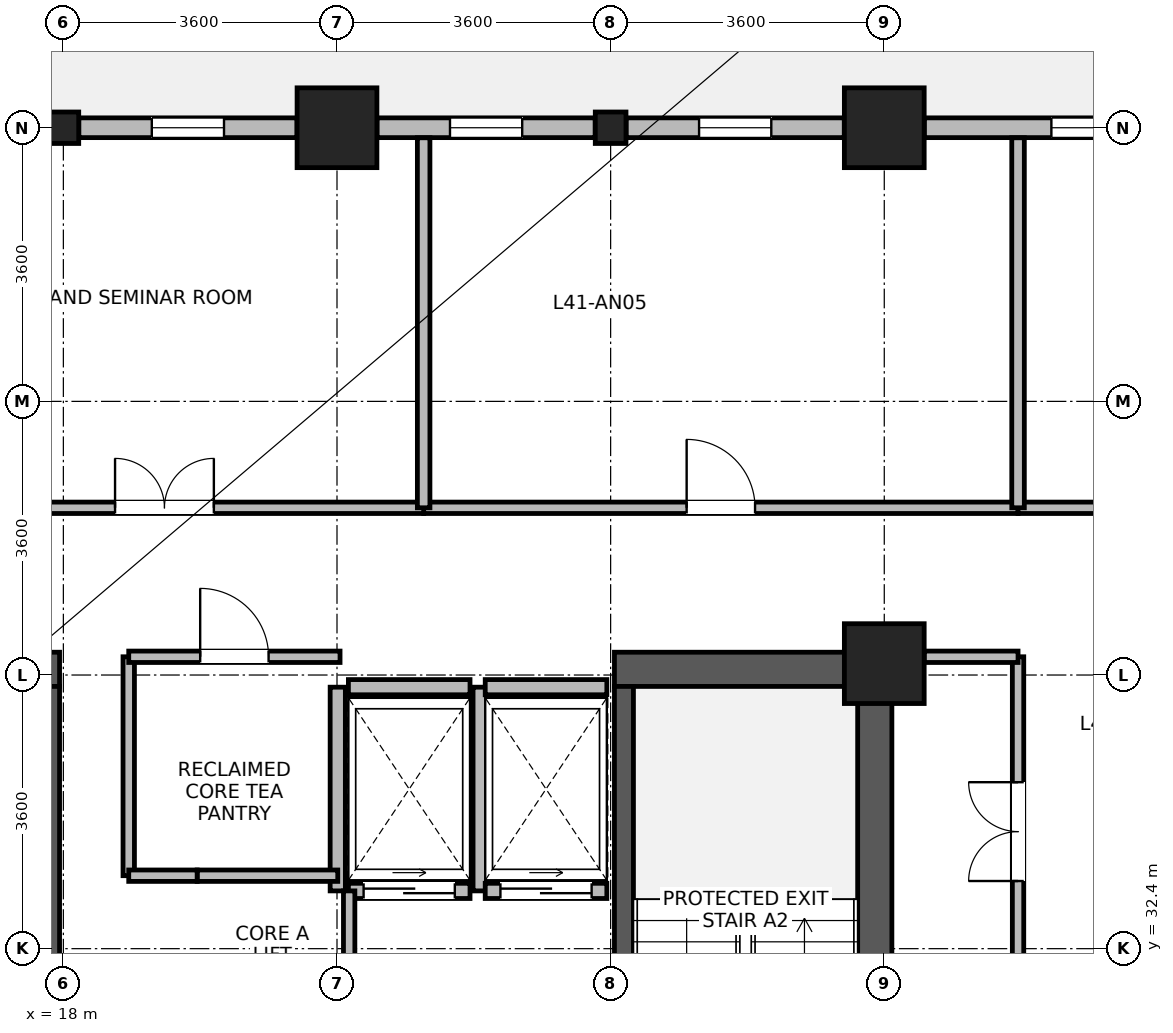
"""IFC4 building model, lengths in metres.
Left out: names, types, materials, properties, quantities, classifications, styles, units other than length and angle.
Written with IfcOpenShell. Run it as: python <this file> out.ifc"""

import sys

from ifc_helpers import new_model, si_unit, direction, frame, frame_2d, origin, origin_2d, place, context, subcontext, project, spatial, rectangle, i_section, extrude, source, transform, mapped, element, fill, save


model = new_model("IFC4")
c1 = context("Model", 3, precision=1e-05, world=origin(), true_north=direction((0.0, 1.0)))
c2 = subcontext(c1, "Body", "Model", "MODEL_VIEW")
j1 = project(units=[si_unit("LENGTHUNIT", "METRE"), si_unit("PLANEANGLEUNIT", "RADIAN")], contexts=[c1])
p1 = place(None, origin())
s1 = spatial("IfcSite", under=j1, at=p1, CompositionType="ELEMENT")
p2 = place(p1, origin())
s2 = spatial("IfcBuilding", under=s1, at=p2, CompositionType="ELEMENT")
p3 = place(p2, frame((0.0, 0.0, 162.4)))
s3 = spatial("IfcBuildingStorey", under=s2, at=p3, CompositionType="ELEMENT", Elevation=162.4)
p4 = place(p3, frame((28.675, 28.4, 0.0), z_axis=(0.0, 0.0, 1.0), x_axis=(0.0, 1.0, 0.0)))
e1 = element("IfcWall", 1, at=p4, inside=s3, PredefinedType="SHEAR", context=c2, shape_type="SweptSolid", body=[
    extrude(rectangle(XDim=7.9, YDim=0.45, at=frame_2d((3.95, 0.0))), origin(), (0.0, 0.0, 1.0), 3.46),
])
for number, where, z_axis, x_axis in (
    (2, (14.75, 36.075, 0.0), (0.0, 0.0, 1.0), (1.0, 0.0, 0.0)),
    (3, (25.25, 36.075, 0.0), (0.0, 0.0, 1.0), (1.0, 0.0, 0.0)),
):
    element("IfcWall", number, at=place(p3, frame(where, z_axis=z_axis, x_axis=x_axis)), inside=s3, PredefinedType="SHEAR", context=c2, shape_type="SweptSolid", body=[
        extrude(rectangle(XDim=3.2, YDim=0.45, at=frame_2d((1.6, 0.0))), origin(), (0.0, 0.0, 1.0), 3.46),
    ])
p5 = place(p3, frame((17.825, 28.85, 0.0), z_axis=(0.0, 0.0, 1.0), x_axis=(0.0, 1.0, 0.0)))
e4 = element("IfcWall", 4, at=p5, inside=s3, PredefinedType="SHEAR", context=c2, shape_type="SweptSolid", body=[
    extrude(rectangle(XDim=7.0, YDim=0.25, at=frame_2d((3.5, 0.0))), origin(), (0.0, 0.0, 1.0), 3.46),
])
p6 = place(p5, frame((0.15, 0.0, 0.0)))
e5 = element("IfcOpeningElement", 5, at=p6, cuts=e4, PredefinedType="OPENING", context=c2, shape_type="SweptSolid", body=[
    extrude(rectangle(XDim=1.1, YDim=2.08, at=frame_2d((0.55, 1.04))), frame((0.0, 0.135, 0.0), z_axis=(0.0, -1.0, 0.0), x_axis=(1.0, 0.0, 0.0)), (0.0, 0.0, 1.0), 0.27),
])
p7 = place(p3, frame((25.375, 28.85, 0.0), z_axis=(0.0, 0.0, 1.0), x_axis=(0.0, 1.0, 0.0)))
e6 = element("IfcWall", 6, at=p7, inside=s3, PredefinedType="SHEAR", context=c2, shape_type="SweptSolid", body=[
    extrude(rectangle(XDim=7.0, YDim=0.25, at=frame_2d((3.5, 0.0))), origin(), (0.0, 0.0, 1.0), 3.46),
])
p8 = place(p7, frame((0.15, 0.0, 0.0)))
e7 = element("IfcOpeningElement", 7, at=p8, cuts=e6, PredefinedType="OPENING", context=c2, shape_type="SweptSolid", body=[
    extrude(rectangle(XDim=1.1, YDim=2.08, at=frame_2d((0.55, 1.04))), frame((0.0, 0.135, 0.0), z_axis=(0.0, -1.0, 0.0), x_axis=(1.0, 0.0, 0.0)), (0.0, 0.0, 1.0), 0.27),
])
m1 = source(origin(), c2, "Body", "SweptSolid", [
    extrude(rectangle(XDim=1.05, YDim=1.05, at=origin_2d()), origin(), (0.0, 0.0, 1.0), 3.7),
])
for number, where, z_axis, x_axis in (
    (8, (21.6, 43.2, 0.0), (0.0, 0.0, 1.0), (1.0, 0.0, 0.0)),
    (9, (28.8, 36.15, 0.0), (0.0, 0.0, 1.0), (1.0, 0.0, 0.0)),
    (10, (28.8, 43.2, 0.0), (0.0, 0.0, 1.0), (1.0, 0.0, 0.0)),
):
    element("IfcColumn", number, at=place(p3, frame(where, z_axis=z_axis, x_axis=x_axis)), inside=s3, PredefinedType="COLUMN", context=c2, shape_type="MappedRepresentation", body=[
        mapped(m1, transform((0.0, 0.0, 0.0), x_axis=(1.0, 0.0, 0.0), y_axis=(0.0, 1.0, 0.0), z_axis=(0.0, 0.0, 1.0), scale=1.0)),
    ])
m2 = source(origin(), c2, "Body", "SweptSolid", [
    extrude(i_section(OverallWidth=0.404, OverallDepth=0.414, WebThickness=0.021, FlangeThickness=0.028, FilletRadius=0.015, at=origin_2d()), origin(), (0.0, 0.0, 1.0), 3.7),
])
for number, where, z_axis, x_axis in (
    (11, (18.0, 43.2, 0.0), (0.0, 0.0, 1.0), (1.0, 0.0, 0.0)),
    (12, (25.2, 43.2, 0.0), (0.0, 0.0, 1.0), (1.0, 0.0, 0.0)),
):
    element("IfcColumn", number, at=place(p3, frame(where, z_axis=z_axis, x_axis=x_axis)), inside=s3, PredefinedType="COLUMN", context=c2, shape_type="MappedRepresentation", body=[
        mapped(m2, transform((0.0, 0.0, 0.0), x_axis=(1.0, 0.0, 0.0), y_axis=(0.0, 1.0, 0.0), z_axis=(0.0, 0.0, 1.0), scale=1.0)),
    ])
p9 = place(p3, frame((29.326, 43.2, 0.0), z_axis=(0.0, 0.0, 1.0), x_axis=(1.0, 0.0, 0.0)))
e13 = element("IfcWall", 13, at=p9, inside=s3, PredefinedType="STANDARD", context=c2, shape_type="SweptSolid", body=[
    extrude(rectangle(XDim=2.871, YDim=0.26, at=frame_2d((1.436, 0.0))), origin(), (0.0, 0.0, 1.0), 2.99),
])
p10 = place(p9, frame((1.673, 0.0, 0.85)))
e14 = element("IfcOpeningElement", 14, at=p10, cuts=e13, PredefinedType="OPENING", context=c2, shape_type="SweptSolid", body=[
    extrude(rectangle(XDim=0.95, YDim=1.75, at=frame_2d((0.475, 0.875))), frame((0.0, 0.14, 0.0), z_axis=(0.0, -1.0, 0.0), x_axis=(1.0, 0.0, 0.0)), (0.0, 0.0, 1.0), 0.28),
])
p11 = place(p3, frame((25.403, 43.2, 0.0), z_axis=(0.0, 0.0, 1.0), x_axis=(1.0, 0.0, 0.0)))
e15 = element("IfcWall", 15, at=p11, inside=s3, PredefinedType="STANDARD", context=c2, shape_type="SweptSolid", body=[
    extrude(rectangle(XDim=2.871, YDim=0.26, at=frame_2d((1.436, 0.0))), origin(), (0.0, 0.0, 1.0), 2.99),
])
p12 = place(p11, frame((0.96, 0.0, 0.85)))
e16 = element("IfcOpeningElement", 16, at=p12, cuts=e15, PredefinedType="OPENING", context=c2, shape_type="SweptSolid", body=[
    extrude(rectangle(XDim=0.95, YDim=1.75, at=frame_2d((0.475, 0.875))), frame((0.0, 0.14, 0.0), z_axis=(0.0, -1.0, 0.0), x_axis=(1.0, 0.0, 0.0)), (0.0, 0.0, 1.0), 0.28),
])
p13 = place(p3, frame((22.126, 43.2, 0.0), z_axis=(0.0, 0.0, 1.0), x_axis=(1.0, 0.0, 0.0)))
e17 = element("IfcWall", 17, at=p13, inside=s3, PredefinedType="STANDARD", context=c2, shape_type="SweptSolid", body=[
    extrude(rectangle(XDim=2.871, YDim=0.26, at=frame_2d((1.436, 0.0))), origin(), (0.0, 0.0, 1.0), 2.99),
])
p14 = place(p13, frame((0.96, 0.0, 0.85)))
e18 = element("IfcOpeningElement", 18, at=p14, cuts=e17, PredefinedType="OPENING", context=c2, shape_type="SweptSolid", body=[
    extrude(rectangle(XDim=0.95, YDim=1.75, at=frame_2d((0.475, 0.875))), frame((0.0, 0.14, 0.0), z_axis=(0.0, -1.0, 0.0), x_axis=(1.0, 0.0, 0.0)), (0.0, 0.0, 1.0), 0.28),
])
p15 = place(p3, frame((18.203, 43.2, 0.0), z_axis=(0.0, 0.0, 1.0), x_axis=(1.0, 0.0, 0.0)))
e19 = element("IfcWall", 19, at=p15, inside=s3, PredefinedType="STANDARD", context=c2, shape_type="SweptSolid", body=[
    extrude(rectangle(XDim=2.871, YDim=0.26, at=frame_2d((1.436, 0.0))), origin(), (0.0, 0.0, 1.0), 2.99),
])
p16 = place(p15, frame((0.96, 0.0, 0.85)))
e20 = element("IfcOpeningElement", 20, at=p16, cuts=e19, PredefinedType="OPENING", context=c2, shape_type="SweptSolid", body=[
    extrude(rectangle(XDim=0.95, YDim=1.75, at=frame_2d((0.475, 0.875))), frame((0.0, 0.14, 0.0), z_axis=(0.0, -1.0, 0.0), x_axis=(1.0, 0.0, 0.0)), (0.0, 0.0, 1.0), 0.28),
])
p17 = place(p3, frame((21.75, 33.16, 0.0), z_axis=(0.0, 0.0, 1.0), x_axis=(1.0, 0.0, 0.0)))
e21 = element("IfcWall", 21, at=p17, inside=s3, PredefinedType="PARTITIONING", context=c2, shape_type="SweptSolid", body=[
    extrude(rectangle(XDim=1.6, YDim=0.2, at=frame_2d((0.8, 0.0))), origin(), (0.0, 0.0, 1.0), 3.44),
])
p18 = place(p17, frame((0.2, 0.0, 0.0)))
e22 = element("IfcOpeningElement", 22, at=p18, cuts=e21, PredefinedType="OPENING", context=c2, shape_type="SweptSolid", body=[
    extrude(rectangle(XDim=1.2, YDim=2.12, at=frame_2d((0.6, 1.06))), frame((0.0, 0.11, 0.0), z_axis=(0.0, -1.0, 0.0), x_axis=(1.0, 0.0, 0.0)), (0.0, 0.0, 1.0), 0.22),
])
p19 = place(p3, frame((21.75, 35.84, 0.0), z_axis=(0.0, 0.0, 1.0), x_axis=(1.0, 0.0, 0.0)))
e23 = element("IfcWall", 23, at=p19, inside=s3, PredefinedType="PARTITIONING", context=c2, shape_type="SweptSolid", body=[
    extrude(rectangle(XDim=1.6, YDim=0.2, at=frame_2d((0.8, 0.0))), origin(), (0.0, 0.0, 1.0), 2.44),
])
for number, where, z_axis, x_axis in (
    (24, (21.61, 33.16, 0.0), (0.0, 0.0, 1.0), (0.0, 1.0, 0.0)),
    (25, (23.49, 33.16, 0.0), (0.0, 0.0, 1.0), (0.0, 1.0, 0.0)),
):
    element("IfcWall", number, at=place(p3, frame(where, z_axis=z_axis, x_axis=x_axis)), inside=s3, PredefinedType="PARTITIONING", context=c2, shape_type="SweptSolid", body=[
        extrude(rectangle(XDim=2.68, YDim=0.2, at=frame_2d((1.34, 0.0))), origin(), (0.0, 0.0, 1.0), 3.44),
    ])
p20 = place(p3, frame((23.55, 33.16, 0.0), z_axis=(0.0, 0.0, 1.0), x_axis=(1.0, 0.0, 0.0)))
e26 = element("IfcWall", 26, at=p20, inside=s3, PredefinedType="PARTITIONING", context=c2, shape_type="SweptSolid", body=[
    extrude(rectangle(XDim=1.6, YDim=0.2, at=frame_2d((0.8, 0.0))), origin(), (0.0, 0.0, 1.0), 3.44),
])
p21 = place(p20, frame((0.2, 0.0, 0.0)))
e27 = element("IfcOpeningElement", 27, at=p21, cuts=e26, PredefinedType="OPENING", context=c2, shape_type="SweptSolid", body=[
    extrude(rectangle(XDim=1.2, YDim=2.12, at=frame_2d((0.6, 1.06))), frame((0.0, 0.11, 0.0), z_axis=(0.0, -1.0, 0.0), x_axis=(1.0, 0.0, 0.0)), (0.0, 0.0, 1.0), 0.22),
])
p22 = place(p3, frame((23.55, 35.84, 0.0), z_axis=(0.0, 0.0, 1.0), x_axis=(1.0, 0.0, 0.0)))
e28 = element("IfcWall", 28, at=p22, inside=s3, PredefinedType="PARTITIONING", context=c2, shape_type="SweptSolid", body=[
    extrude(rectangle(XDim=1.6, YDim=0.2, at=frame_2d((0.8, 0.0))), origin(), (0.0, 0.0, 1.0), 2.44),
])
p23 = place(p3, frame((22.74, 38.2, 0.0), z_axis=(0.0, 0.0, 1.0), x_axis=(1.0, 0.0, 0.0)))
e29 = element("IfcWall", 29, at=p23, inside=s3, PredefinedType="PARTITIONING", context=c2, shape_type="SweptSolid", body=[
    extrude(rectangle(XDim=7.82, YDim=0.15, at=frame_2d((3.91, 0.0))), origin(), (0.0, 0.0, 1.0), 3.44),
])
p24 = place(p23, frame((3.46, 0.0, 0.0)))
e30 = element("IfcOpeningElement", 30, at=p24, cuts=e29, PredefinedType="OPENING", context=c2, shape_type="SweptSolid", body=[
    extrude(rectangle(XDim=0.9, YDim=2.08, at=frame_2d((0.45, 1.04))), frame((0.0, 0.085, 0.0), z_axis=(0.0, -1.0, 0.0), x_axis=(1.0, 0.0, 0.0)), (0.0, 0.0, 1.0), 0.17),
])
p25 = place(p3, frame((15.92, 38.2, 0.0), z_axis=(0.0, 0.0, 1.0), x_axis=(1.0, 0.0, 0.0)))
e31 = element("IfcWall", 31, at=p25, inside=s3, PredefinedType="PARTITIONING", context=c2, shape_type="SweptSolid", body=[
    extrude(rectangle(XDim=6.82, YDim=0.15, at=frame_2d((3.41, 0.0))), origin(), (0.0, 0.0, 1.0), 3.44),
])
p26 = place(p25, frame((2.76, 0.0, 0.0)))
e32 = element("IfcOpeningElement", 32, at=p26, cuts=e31, PredefinedType="OPENING", context=c2, shape_type="SweptSolid", body=[
    extrude(rectangle(XDim=1.3, YDim=2.12, at=frame_2d((0.65, 1.06))), frame((0.0, 0.085, 0.0), z_axis=(0.0, -1.0, 0.0), x_axis=(1.0, 0.0, 0.0)), (0.0, 0.0, 1.0), 0.17),
])
p27 = place(p3, frame((30.56, 38.2, 0.0), z_axis=(0.0, 0.0, 1.0), x_axis=(1.0, 0.0, 0.0)))
e33 = element("IfcWall", 33, at=p27, inside=s3, PredefinedType="PARTITIONING", context=c2, shape_type="SweptSolid", body=[
    extrude(rectangle(XDim=4.8, YDim=0.15, at=frame_2d((2.4, 0.0))), origin(), (0.0, 0.0, 1.0), 3.44),
])
p28 = place(p27, frame((1.75, 0.0, 0.0)))
e34 = element("IfcOpeningElement", 34, at=p28, cuts=e33, PredefinedType="OPENING", context=c2, shape_type="SweptSolid", body=[
    extrude(rectangle(XDim=1.3, YDim=2.12, at=frame_2d((0.65, 1.06))), frame((0.0, 0.085, 0.0), z_axis=(0.0, -1.0, 0.0), x_axis=(1.0, 0.0, 0.0)), (0.0, 0.0, 1.0), 0.17),
])
p29 = place(p3, frame((30.56, 31.64, 0.0), z_axis=(0.0, 0.0, 1.0), x_axis=(0.0, 1.0, 0.0)))
e35 = element("IfcWall", 35, at=p29, inside=s3, PredefinedType="PARTITIONING", context=c2, shape_type="SweptSolid", body=[
    extrude(rectangle(XDim=4.6, YDim=0.15, at=frame_2d((2.3, 0.0))), origin(), (0.0, 0.0, 1.0), 3.44),
])
p30 = place(p29, frame((1.65, 0.0, 0.0)))
e36 = element("IfcOpeningElement", 36, at=p30, cuts=e35, PredefinedType="OPENING", context=c2, shape_type="SweptSolid", body=[
    extrude(rectangle(XDim=1.3, YDim=2.12, at=frame_2d((0.65, 1.06))), frame((0.0, 0.085, 0.0), z_axis=(0.0, -1.0, 0.0), x_axis=(1.0, 0.0, 0.0)), (0.0, 0.0, 1.0), 0.17),
])
p31 = place(p3, frame((18.86, 33.36, 0.0), z_axis=(0.0, 0.0, 1.0), x_axis=(0.0, 1.0, 0.0)))
e37 = element("IfcWall", 37, at=p31, inside=s3, PredefinedType="PARTITIONING", context=c2, shape_type="SweptSolid", body=[
    extrude(rectangle(XDim=2.88, YDim=0.15, at=frame_2d((1.44, 0.0))), origin(), (0.0, 0.0, 1.0), 3.44),
])
p32 = place(p3, frame((18.86, 36.24, 0.0), z_axis=(0.0, 0.0, 1.0), x_axis=(1.0, 0.0, 0.0)))
e38 = element("IfcWall", 38, at=p32, inside=s3, PredefinedType="PARTITIONING", context=c2, shape_type="SweptSolid", body=[
    extrude(rectangle(XDim=2.78, YDim=0.15, at=frame_2d((1.39, 0.0))), origin(), (0.0, 0.0, 1.0), 2.44),
])
p33 = place(p32, frame((0.94, 0.0, 0.0)))
e39 = element("IfcOpeningElement", 39, at=p33, cuts=e38, PredefinedType="OPENING", context=c2, shape_type="SweptSolid", body=[
    extrude(rectangle(XDim=0.9, YDim=2.08, at=frame_2d((0.45, 1.04))), frame((0.0, 0.085, 0.0), z_axis=(0.0, -1.0, 0.0), x_axis=(1.0, 0.0, 0.0)), (0.0, 0.0, 1.0), 0.17),
])
p34 = place(p3, frame((19.76, 33.36, 0.0), z_axis=(0.0, 0.0, 1.0), x_axis=(1.0, 0.0, 0.0)))
e40 = element("IfcWall", 40, at=p34, inside=s3, PredefinedType="PARTITIONING", context=c2, shape_type="SweptSolid", body=[
    extrude(rectangle(XDim=1.85, YDim=0.15, at=frame_2d((0.925, 0.0))), origin(), (0.0, 0.0, 1.0), 3.44),
])
p35 = place(p3, frame((29.325, 36.24, 0.0), z_axis=(0.0, 0.0, 1.0), x_axis=(1.0, 0.0, 0.0)))
e41 = element("IfcWall", 41, at=p35, inside=s3, PredefinedType="PARTITIONING", context=c2, shape_type="SweptSolid", body=[
    extrude(rectangle(XDim=1.235, YDim=0.15, at=frame_2d((0.618, 0.0))), origin(), (0.0, 0.0, 1.0), 2.84),
])
p36 = place(p3, frame((18.86, 33.36, 0.0), z_axis=(0.0, 0.0, 1.0), x_axis=(1.0, 0.0, 0.0)))
e42 = element("IfcWall", 42, at=p36, inside=s3, PredefinedType="PARTITIONING", context=c2, shape_type="SweptSolid", body=[
    extrude(rectangle(XDim=0.9, YDim=0.15, at=frame_2d((0.45, 0.0))), origin(), (0.0, 0.0, 1.0), 3.44),
])
for number, where, z_axis, x_axis in (
    (43, (22.74, 38.2, 0.0), (0.0, 0.0, 1.0), (0.0, 1.0, 0.0)),
    (44, (30.56, 38.2, 0.0), (0.0, 0.0, 1.0), (0.0, 1.0, 0.0)),
):
    element("IfcWall", number, at=place(p3, frame(where, z_axis=z_axis, x_axis=x_axis)), inside=s3, PredefinedType="PARTITIONING", context=c2, shape_type="SweptSolid", body=[
        extrude(rectangle(XDim=4.868, YDim=0.165, at=frame_2d((2.434, 0.0))), origin(), (0.0, 0.0, 1.0), 3.44),
    ])
p37 = place(p3, frame((21.76, 31.24, 0.0), z_axis=(0.0, 0.0, 1.0), x_axis=(0.0, 1.0, 0.0)))
e45 = element("IfcWall", 45, at=p37, inside=s3, PredefinedType="PARTITIONING", context=c2, shape_type="SweptSolid", body=[
    extrude(rectangle(XDim=1.92, YDim=0.15, at=frame_2d((0.96, 0.0))), origin(), (0.0, 0.0, 1.0), 3.44),
])
p38 = place(p10, origin())
e46 = element("IfcWindow", 46, at=p38, inside=s3, PartitioningType="SINGLE_PANEL", PredefinedType="WINDOW", context=c2, shape_type="SweptSolid", body=[
    extrude(rectangle(XDim=0.95, YDim=1.75, at=frame_2d((0.475, 0.875))), frame((0.0, 0.03, 0.0), z_axis=(0.0, -1.0, 0.0), x_axis=(1.0, 0.0, 0.0)), (0.0, 0.0, 1.0), 0.06),
])
fill(e14, e46)
p39 = place(p12, origin())
e47 = element("IfcWindow", 47, at=p39, inside=s3, PartitioningType="SINGLE_PANEL", PredefinedType="WINDOW", context=c2, shape_type="SweptSolid", body=[
    extrude(rectangle(XDim=0.95, YDim=1.75, at=frame_2d((0.475, 0.875))), frame((0.0, 0.03, 0.0), z_axis=(0.0, -1.0, 0.0), x_axis=(1.0, 0.0, 0.0)), (0.0, 0.0, 1.0), 0.06),
])
fill(e16, e47)
p40 = place(p14, origin())
e48 = element("IfcWindow", 48, at=p40, inside=s3, PartitioningType="SINGLE_PANEL", PredefinedType="WINDOW", context=c2, shape_type="SweptSolid", body=[
    extrude(rectangle(XDim=0.95, YDim=1.75, at=frame_2d((0.475, 0.875))), frame((0.0, 0.03, 0.0), z_axis=(0.0, -1.0, 0.0), x_axis=(1.0, 0.0, 0.0)), (0.0, 0.0, 1.0), 0.06),
])
fill(e18, e48)
p41 = place(p16, origin())
e49 = element("IfcWindow", 49, at=p41, inside=s3, PartitioningType="SINGLE_PANEL", PredefinedType="WINDOW", context=c2, shape_type="SweptSolid", body=[
    extrude(rectangle(XDim=0.95, YDim=1.75, at=frame_2d((0.475, 0.875))), frame((0.0, 0.03, 0.0), z_axis=(0.0, -1.0, 0.0), x_axis=(1.0, 0.0, 0.0)), (0.0, 0.0, 1.0), 0.06),
])
fill(e20, e49)
p42 = place(p18, origin())
e50 = element("IfcDoor", 50, at=p42, inside=s3, OperationType="SLIDING_TO_RIGHT", PredefinedType="DOOR", context=c2, shape_type="SweptSolid", body=[
    extrude(rectangle(XDim=1.2, YDim=2.12, at=frame_2d((0.6, 1.06))), frame((0.0, 0.025, 0.0), z_axis=(0.0, -1.0, 0.0), x_axis=(1.0, 0.0, 0.0)), (0.0, 0.0, 1.0), 0.05),
])
fill(e22, e50)
p43 = place(p21, origin())
e51 = element("IfcDoor", 51, at=p43, inside=s3, OperationType="SLIDING_TO_RIGHT", PredefinedType="DOOR", context=c2, shape_type="SweptSolid", body=[
    extrude(rectangle(XDim=1.2, YDim=2.12, at=frame_2d((0.6, 1.06))), frame((0.0, 0.025, 0.0), z_axis=(0.0, -1.0, 0.0), x_axis=(1.0, 0.0, 0.0)), (0.0, 0.0, 1.0), 0.05),
])
fill(e27, e51)
p44 = place(p24, origin())
e52 = element("IfcDoor", 52, at=p44, inside=s3, OperationType="SINGLE_SWING_LEFT", PredefinedType="DOOR", context=c2, shape_type="SweptSolid", body=[
    extrude(rectangle(XDim=0.9, YDim=2.08, at=frame_2d((0.45, 1.04))), frame((0.0, 0.025, 0.0), z_axis=(0.0, -1.0, 0.0), x_axis=(1.0, 0.0, 0.0)), (0.0, 0.0, 1.0), 0.05),
])
fill(e30, e52)
p45 = place(p26, origin())
e53 = element("IfcDoor", 53, at=p45, inside=s3, OperationType="DOUBLE_DOOR_SINGLE_SWING", PredefinedType="DOOR", context=c2, shape_type="SweptSolid", body=[
    extrude(rectangle(XDim=1.3, YDim=2.12, at=frame_2d((0.65, 1.06))), frame((0.0, 0.025, 0.0), z_axis=(0.0, -1.0, 0.0), x_axis=(1.0, 0.0, 0.0)), (0.0, 0.0, 1.0), 0.05),
])
fill(e32, e53)
p46 = place(p30, origin())
e54 = element("IfcDoor", 54, at=p46, inside=s3, OperationType="DOUBLE_DOOR_SINGLE_SWING", PredefinedType="DOOR", context=c2, shape_type="SweptSolid", body=[
    extrude(rectangle(XDim=1.3, YDim=2.12, at=frame_2d((0.65, 1.06))), frame((0.0, 0.025, 0.0), z_axis=(0.0, -1.0, 0.0), x_axis=(1.0, 0.0, 0.0)), (0.0, 0.0, 1.0), 0.05),
])
fill(e36, e54)
p47 = place(p33, origin())
e55 = element("IfcDoor", 55, at=p47, inside=s3, OperationType="SINGLE_SWING_LEFT", PredefinedType="DOOR", context=c2, shape_type="SweptSolid", body=[
    extrude(rectangle(XDim=0.9, YDim=2.08, at=frame_2d((0.45, 1.04))), frame((0.0, 0.025, 0.0), z_axis=(0.0, -1.0, 0.0), x_axis=(1.0, 0.0, 0.0)), (0.0, 0.0, 1.0), 0.05),
])
fill(e39, e55)
save(model, sys.argv[1])
